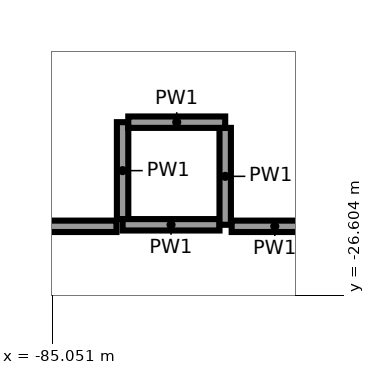
"""IFC4 building model, lengths in metres.
Left out: names, types, materials, properties, quantities, classifications, styles, units other than length and angle.
Written with IfcOpenShell. Run it as: python <this file> out.ifc"""

import sys

from ifc_helpers import new_model, si_unit, direction, frame, frame_2d, origin, place, context, subcontext, project, spatial, rectangle, extrude, element, save


model = new_model("IFC4")
c1 = context("Model", 3, precision=1e-05, world=origin(), true_north=direction((0.0, 1.0)))
c2 = subcontext(c1, "Body", "Model", "MODEL_VIEW")
j1 = project(units=[si_unit("LENGTHUNIT", "METRE"), si_unit("PLANEANGLEUNIT", "RADIAN")], contexts=[c1])
p1 = place(None, origin())
s1 = spatial("IfcSite", under=j1, at=p1, CompositionType="ELEMENT")
p2 = place(p1, origin())
s2 = spatial("IfcBuilding", under=s1, at=p2, CompositionType="ELEMENT")
p3 = place(p2, frame((0.0, 0.0, 12.0)))
s3 = spatial("IfcBuildingStorey", under=s2, at=p3, CompositionType="ELEMENT", Elevation=12.0)
p4 = place(p3, frame((-84.125, -24.325, 0.0), z_axis=(0.0, 0.0, 1.0), x_axis=(0.0, -1.0, 0.0)))
e1 = element("IfcWall", 1, at=p4, inside=s3, PredefinedType="PARTITIONING", context=c2, shape_type="SweptSolid", body=[
    extrude(rectangle(XDim=1.275, YDim=0.15, at=frame_2d((0.638, 0.0))), origin(), (0.0, 0.0, 1.0), 5.65),
])
p5 = place(p3, frame((-84.125, -25.675, 0.0), z_axis=(0.0, 0.0, 1.0), x_axis=(1.0, 0.0, 0.0)))
e2 = element("IfcWall", 2, at=p5, inside=s3, PredefinedType="PARTITIONING", context=c2, shape_type="SweptSolid", body=[
    extrude(rectangle(XDim=1.275, YDim=0.15, at=frame_2d((0.637, 0.0))), origin(), (0.0, 0.0, 1.0), 5.65),
])
for number, where, z_axis, x_axis in (
    (3, (-82.775, -25.675, 0.0), (0.0, 0.0, 1.0), (0.0, 1.0, 0.0)),
    (4, (-82.775, -24.325, 0.0), (0.0, 0.0, 1.0), (-1.0, 0.0, 0.0)),
):
    element("IfcWall", number, at=place(p3, frame(where, z_axis=z_axis, x_axis=x_axis)), inside=s3, PredefinedType="PARTITIONING", context=c2, shape_type="SweptSolid", body=[
        extrude(rectangle(XDim=1.275, YDim=0.15, at=frame_2d((0.638, 0.0))), origin(), (0.0, 0.0, 1.0), 5.65),
    ])
p6 = place(p3, frame((-87.909, -25.695, 0.0), z_axis=(0.0, 0.0, 1.0), x_axis=(1.0, 0.0, 0.0)))
e5 = element("IfcWall", 5, at=p6, inside=s3, PredefinedType="PARTITIONING", context=c2, shape_type="SweptSolid", body=[
    extrude(rectangle(XDim=3.704, YDim=0.15, at=frame_2d((1.852, 0.0))), origin(), (0.0, 0.0, 1.0), 4.55),
])
p7 = place(p6, frame((0.65, 0.0, 0.0)))
e6 = element("IfcOpeningElement", 6, at=p7, cuts=e5, PredefinedType="OPENING", context=c2, shape_type="SweptSolid", body=[
    extrude(rectangle(XDim=1.8, YDim=2.1, at=frame_2d((0.9, 1.05))), frame((0.0, 0.085, 0.0), z_axis=(0.0, -1.0, 0.0), x_axis=(1.0, 0.0, 0.0)), (0.0, 0.0, 1.0), 0.17),
])
p8 = place(p3, frame((-82.69, -25.695, 0.0), z_axis=(0.0, 0.0, 1.0), x_axis=(1.0, 0.0, 0.0)))
e7 = element("IfcWall", 7, at=p8, inside=s3, PredefinedType="PARTITIONING", context=c2, shape_type="SweptSolid", body=[
    extrude(rectangle(XDim=1.135, YDim=0.15, at=frame_2d((0.567, 0.0))), origin(), (0.0, 0.0, 1.0), 5.65),
])
save(model, sys.argv[1])
